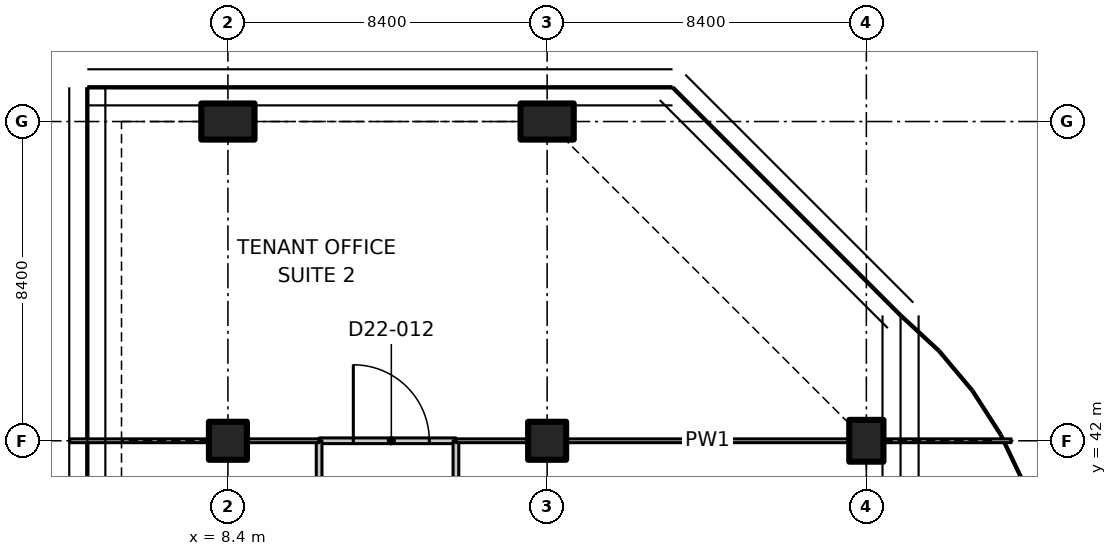
"""IFC4 building model, lengths in metres.
Left out: names, types, materials, properties, quantities, classifications, styles, units other than length and angle.
Written with IfcOpenShell. Run it as: python <this file> out.ifc"""

import sys

from ifc_helpers import new_model, si_unit, direction, frame, frame_2d, origin, origin_2d, place, context, subcontext, project, spatial, polyline, rectangle, outline, extrude, element, fill, save


model = new_model("IFC4")
c1 = context("Model", 3, precision=1e-05, world=origin(), true_north=direction((0.0, 1.0)))
c2 = subcontext(c1, "Body", "Model", "MODEL_VIEW")
j1 = project(units=[si_unit("LENGTHUNIT", "METRE"), si_unit("PLANEANGLEUNIT", "RADIAN")], contexts=[c1])
p1 = place(None, origin())
s1 = spatial("IfcSite", under=j1, at=p1, CompositionType="ELEMENT")
p2 = place(p1, origin())
s2 = spatial("IfcBuilding", under=s1, at=p2, CompositionType="ELEMENT")
p3 = place(p2, frame((0.0, 0.0, 181.2)))
s3 = spatial("IfcBuildingStorey", under=s2, at=p3, CompositionType="ELEMENT", Elevation=181.2)
p4 = place(p3, frame((8.4, 42.0, 0.0), z_axis=(0.0, 0.0, 1.0), x_axis=(1.0, 0.0, 0.0)))
e1 = element("IfcColumn", 1, at=p4, inside=s3, PredefinedType="COLUMN", context=c2, shape_type="SweptSolid", body=[
    extrude(rectangle(XDim=1.0, YDim=1.0, at=origin_2d()), origin(), (0.0, 0.0, 1.0), 3.35),
])
p5 = place(p3, frame((8.4, 50.4, 0.0), z_axis=(0.0, 0.0, 1.0), x_axis=(0.0, 1.0, 0.0)))
e2 = element("IfcColumn", 2, at=p5, inside=s3, PredefinedType="COLUMN", context=c2, shape_type="SweptSolid", body=[
    extrude(rectangle(XDim=0.95, YDim=1.4, at=origin_2d()), origin(), (0.0, 0.0, 1.0), 3.35),
])
p6 = place(p3, frame((16.8, 42.0, 0.0), z_axis=(0.0, 0.0, 1.0), x_axis=(1.0, 0.0, 0.0)))
e3 = element("IfcColumn", 3, at=p6, inside=s3, PredefinedType="COLUMN", context=c2, shape_type="SweptSolid", body=[
    extrude(rectangle(XDim=1.0, YDim=1.0, at=origin_2d()), origin(), (0.0, 0.0, 1.0), 3.35),
])
p7 = place(p3, frame((16.8, 50.4, 0.0), z_axis=(0.0, 0.0, 1.0), x_axis=(0.0, 1.0, 0.0)))
e4 = element("IfcColumn", 4, at=p7, inside=s3, PredefinedType="COLUMN", context=c2, shape_type="SweptSolid", body=[
    extrude(rectangle(XDim=0.95, YDim=1.4, at=origin_2d()), origin(), (0.0, 0.0, 1.0), 3.35),
])
p8 = place(p3, frame((25.2, 42.0, 0.0), z_axis=(0.0, 0.0, 1.0), x_axis=(1.0, 0.0, 0.0)))
e5 = element("IfcColumn", 5, at=p8, inside=s3, PredefinedType="COLUMN", context=c2, shape_type="SweptSolid", body=[
    extrude(rectangle(XDim=0.9, YDim=1.1, at=origin_2d()), origin(), (0.0, 0.0, 1.0), 3.35),
])
p9 = place(p3, frame((10.8, 42.0, 0.0), z_axis=(0.0, 0.0, 1.0), x_axis=(1.0, 0.0, 0.0)))
e6 = element("IfcWall", 6, at=p9, inside=s3, PredefinedType="PARTITIONING", context=c2, shape_type="SweptSolid", body=[
    extrude(rectangle(XDim=3.6, YDim=0.15, at=frame_2d((1.8, 0.0))), origin(), (0.0, 0.0, 1.0), 3.33),
])
p10 = place(p9, frame((0.9, 0.0, 0.0)))
e7 = element("IfcOpeningElement", 7, at=p10, cuts=e6, PredefinedType="OPENING", context=c2, shape_type="SweptSolid", body=[
    extrude(rectangle(XDim=2.0, YDim=2.4, at=frame_2d((1.0, 1.2))), frame((0.0, 0.085, 0.0), z_axis=(0.0, -1.0, 0.0), x_axis=(1.0, 0.0, 0.0)), (0.0, 0.0, 1.0), 0.17),
])
p11 = place(p3, frame((10.8, 37.8, 0.0), z_axis=(0.0, 0.0, 1.0), x_axis=(0.0, 1.0, 0.0)))
e8 = element("IfcWall", 8, at=p11, inside=s3, PredefinedType="PARTITIONING", context=c2, shape_type="SweptSolid", body=[
    extrude(rectangle(XDim=4.2, YDim=0.15, at=frame_2d((2.1, 0.0))), origin(), (0.0, 0.0, 1.0), 3.33),
])
p12 = place(p11, frame((1.5, 0.0, 0.0)))
e9 = element("IfcOpeningElement", 9, at=p12, cuts=e8, PredefinedType="OPENING", context=c2, shape_type="SweptSolid", body=[
    extrude(rectangle(XDim=1.1, YDim=2.1, at=frame_2d((0.55, 1.05))), frame((0.0, 0.085, 0.0), z_axis=(0.0, -1.0, 0.0), x_axis=(1.0, 0.0, 0.0)), (0.0, 0.0, 1.0), 0.17),
])
p13 = place(p3, frame((14.4, 42.0, 0.0), z_axis=(0.0, 0.0, 1.0), x_axis=(0.0, -1.0, 0.0)))
e10 = element("IfcWall", 10, at=p13, inside=s3, PredefinedType="PARTITIONING", context=c2, shape_type="SweptSolid", body=[
    extrude(rectangle(XDim=8.4, YDim=0.15, at=frame_2d((4.2, 0.0))), origin(), (0.0, 0.0, 1.0), 3.33),
])
p14 = place(p3, frame((10.8, 42.0, 0.0), z_axis=(0.0, 0.0, 1.0), x_axis=(-1.0, 0.0, 0.0)))
e11 = element("IfcWall", 11, at=p14, inside=s3, PredefinedType="PARTITIONING", context=c2, shape_type="SweptSolid", body=[
    extrude(rectangle(XDim=1.88, YDim=0.1, at=frame_2d((0.94, 0.0))), origin(), (0.0, 0.0, 1.0), 3.33),
])
p15 = place(p3, frame((7.88, 42.0, 0.0), z_axis=(0.0, 0.0, 1.0), x_axis=(-1.0, 0.0, 0.0)))
e12 = element("IfcWall", 12, at=p15, inside=s3, PredefinedType="PARTITIONING", context=c2, shape_type="SweptSolid", body=[
    extrude(rectangle(XDim=3.645, YDim=0.1, at=frame_2d((1.822, 0.0))), origin(), (0.0, 0.0, 1.0), 2.98),
])
p16 = place(p3, frame((29.011, 42.0, 0.0), z_axis=(0.0, 0.0, 1.0), x_axis=(-1.0, 0.0, 0.0)))
e13 = element("IfcWall", 13, at=p16, inside=s3, PredefinedType="PARTITIONING", context=c2, shape_type="SweptSolid", body=[
    extrude(rectangle(XDim=3.342, YDim=0.1, at=frame_2d((1.671, 0.0))), origin(), (0.0, 0.0, 1.0), 2.98),
])
p17 = place(p3, frame((24.73, 42.0, 0.0), z_axis=(0.0, 0.0, 1.0), x_axis=(-1.0, 0.0, 0.0)))
e14 = element("IfcWall", 14, at=p17, inside=s3, PredefinedType="PARTITIONING", context=c2, shape_type="SweptSolid", body=[
    extrude(outline(polyline([(0.0, 0.0), (7.41, 0.0), (7.41, 3.33), (0.196, 3.33), (0.194, 2.98), (0.0, 2.98), (0.0, 0.0)])), frame((0.0, 0.05, 0.0), z_axis=(0.0, -1.0, 0.0), x_axis=(1.0, 0.0, 0.0)), (0.0, 0.0, 1.0), 0.1),
])
p18 = place(p3, frame((16.28, 42.0, 0.0), z_axis=(0.0, 0.0, 1.0), x_axis=(-1.0, 0.0, 0.0)))
e15 = element("IfcWall", 15, at=p18, inside=s3, PredefinedType="PARTITIONING", context=c2, shape_type="SweptSolid", body=[
    extrude(rectangle(XDim=1.88, YDim=0.1, at=frame_2d((0.94, 0.0))), origin(), (0.0, 0.0, 1.0), 3.33),
])
p19 = place(p10, origin())
e16 = element("IfcDoor", 16, at=p19, inside=s3, OperationType="DOUBLE_DOOR_SINGLE_SWING", PredefinedType="DOOR", context=c2, shape_type="SweptSolid", body=[
    extrude(rectangle(XDim=2.0, YDim=2.4, at=frame_2d((1.0, 1.2))), frame((0.0, 0.025, 0.0), z_axis=(0.0, -1.0, 0.0), x_axis=(1.0, 0.0, 0.0)), (0.0, 0.0, 1.0), 0.05),
])
fill(e7, e16)
save(model, sys.argv[1])
